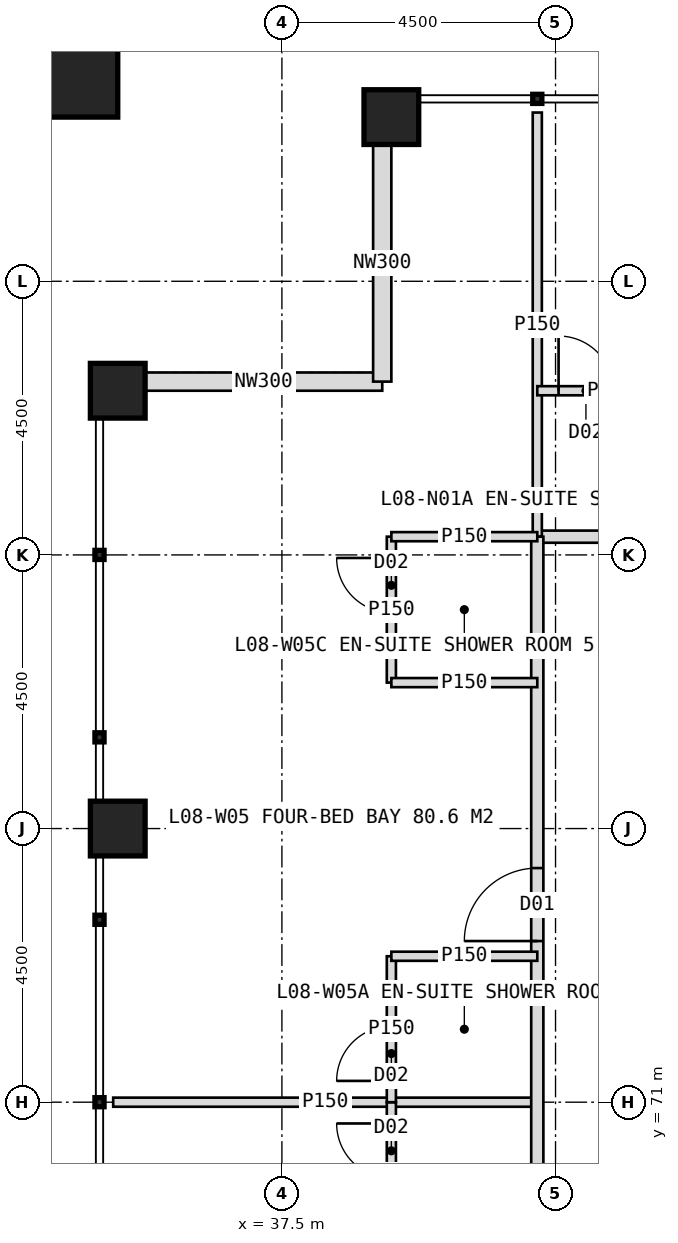
"""IFC4 building model, lengths in metres.
Left out: names, types, materials, properties, quantities, classifications, styles, units other than length and angle.
Written with IfcOpenShell. Run it as: python <this file> out.ifc"""

import sys

from ifc_helpers import new_model, si_unit, direction, frame, frame_2d, origin, origin_2d, place, context, subcontext, project, spatial, rectangle, hollow_rectangle, extrude, element, fill, save


model = new_model("IFC4")
c1 = context("Model", 3, precision=1e-05, world=origin(), true_north=direction((0.0, 1.0)))
c2 = subcontext(c1, "Body", "Model", "MODEL_VIEW")
j1 = project(units=[si_unit("LENGTHUNIT", "METRE"), si_unit("PLANEANGLEUNIT", "RADIAN")], contexts=[c1])
p1 = place(None, origin())
s1 = spatial("IfcSite", under=j1, at=p1, CompositionType="ELEMENT")
p2 = place(p1, origin())
s2 = spatial("IfcBuilding", under=s1, at=p2, CompositionType="ELEMENT")
p3 = place(p2, frame((0.0, 0.0, 39.0)))
s3 = spatial("IfcBuildingStorey", under=s2, at=p3, CompositionType="ELEMENT", Elevation=39.0)
for number, where, z_axis, x_axis in (
    (1, (39.3, 87.2, 0.0), (0.0, 0.0, 1.0), (1.0, 0.0, 0.0)),
    (2, (34.8, 75.5, 0.0), (0.0, 0.0, 1.0), (1.0, 0.0, 0.0)),
    (3, (34.8, 82.7, 0.0), (0.0, 0.0, 1.0), (1.0, 0.0, 0.0)),
):
    element("IfcColumn", number, at=place(p3, frame(where, z_axis=z_axis, x_axis=x_axis)), inside=s3, PredefinedType="COLUMN", context=c2, shape_type="SweptSolid", body=[
        extrude(hollow_rectangle(XDim=0.9, YDim=0.9, WallThickness=0.08, at=origin_2d()), origin(), (0.0, 0.0, 1.0), 4.0),
    ])
p4 = place(p3, frame((33.9, 88.1, 0.0), z_axis=(0.0, 0.0, 1.0), x_axis=(1.0, 0.0, 0.0)))
e4 = element("IfcColumn", 4, at=p4, inside=s3, PredefinedType="COLUMN", context=c2, shape_type="SweptSolid", body=[
    extrude(hollow_rectangle(XDim=1.8, YDim=1.8, WallThickness=0.1, at=origin_2d()), origin(), (0.0, 0.0, 1.0), 4.0),
])
for number, where, z_axis, x_axis in (
    (5, (35.25, 82.85, 0.0), (0.0, 0.0, 1.0), (1.0, 0.0, 0.0)),
    (6, (39.15, 82.85, 0.0), (0.0, 0.0, 1.0), (0.0, 1.0, 0.0)),
):
    element("IfcWall", number, at=place(p3, frame(where, z_axis=z_axis, x_axis=x_axis)), inside=s3, PredefinedType="ELEMENTEDWALL", context=c2, shape_type="SweptSolid", body=[
        extrude(rectangle(XDim=3.9, YDim=0.3, at=frame_2d((1.95, 0.0))), origin(), (0.0, 0.0, 1.0), 2.95),
    ])
p5 = place(p3, frame((41.7, 80.3, 0.0), z_axis=(0.0, 0.0, 1.0), x_axis=(1.0, 0.0, 0.0)))
e7 = element("IfcWall", 7, at=p5, inside=s3, PredefinedType="PARTITIONING", context=c2, shape_type="SweptSolid", body=[
    extrude(rectangle(XDim=36.6, YDim=0.2, at=frame_2d((18.3, 0.0))), origin(), (0.0, 0.0, 1.0), 3.75),
])
p6 = place(p5, frame((2.65, 0.0, 0.0)))
e8 = element("IfcOpeningElement", 8, at=p6, cuts=e7, PredefinedType="OPENING", context=c2, shape_type="SweptSolid", body=[
    extrude(rectangle(XDim=1.2, YDim=2.2, at=frame_2d((0.6, 1.1))), frame((0.0, 0.11, 0.0), z_axis=(0.0, -1.0, 0.0), x_axis=(1.0, 0.0, 0.0)), (0.0, 0.0, 1.0), 0.22),
])
p7 = place(p5, frame((11.95, 0.0, 0.0)))
e9 = element("IfcOpeningElement", 9, at=p7, cuts=e7, PredefinedType="OPENING", context=c2, shape_type="SweptSolid", body=[
    extrude(rectangle(XDim=1.2, YDim=2.2, at=frame_2d((0.6, 1.1))), frame((0.0, 0.11, 0.0), z_axis=(0.0, -1.0, 0.0), x_axis=(1.0, 0.0, 0.0)), (0.0, 0.0, 1.0), 0.22),
])
p8 = place(p5, frame((20.8, 0.0, 0.0)))
e10 = element("IfcOpeningElement", 10, at=p8, cuts=e7, PredefinedType="OPENING", context=c2, shape_type="SweptSolid", body=[
    extrude(rectangle(XDim=1.0, YDim=2.1, at=frame_2d((0.5, 1.05))), frame((0.0, 0.11, 0.0), z_axis=(0.0, -1.0, 0.0), x_axis=(1.0, 0.0, 0.0)), (0.0, 0.0, 1.0), 0.22),
])
p9 = place(p5, frame((26.95, 0.0, 0.0)))
e11 = element("IfcOpeningElement", 11, at=p9, cuts=e7, PredefinedType="OPENING", context=c2, shape_type="SweptSolid", body=[
    extrude(rectangle(XDim=1.2, YDim=2.2, at=frame_2d((0.6, 1.1))), frame((0.0, 0.11, 0.0), z_axis=(0.0, -1.0, 0.0), x_axis=(1.0, 0.0, 0.0)), (0.0, 0.0, 1.0), 0.22),
])
p10 = place(p3, frame((41.7, 80.3, 0.0), z_axis=(0.0, 0.0, 1.0), x_axis=(0.0, 1.0, 0.0)))
e12 = element("IfcWall", 12, at=p10, inside=s3, PredefinedType="PARTITIONING", context=c2, shape_type="SweptSolid", body=[
    extrude(rectangle(XDim=6.975, YDim=0.15, at=frame_2d((3.487, 0.0))), origin(), (0.0, 0.0, 1.0), 3.75),
])
p11 = place(p3, frame((41.7, 82.7, 0.0), z_axis=(0.0, 0.0, 1.0), x_axis=(1.0, 0.0, 0.0)))
e13 = element("IfcWall", 13, at=p11, inside=s3, PredefinedType="PARTITIONING", context=c2, shape_type="SweptSolid", body=[
    extrude(rectangle(XDim=2.4, YDim=0.15, at=frame_2d((1.2, 0.0))), origin(), (0.0, 0.0, 1.0), 2.95),
])
p12 = place(p11, frame((0.35, 0.0, 0.0)))
e14 = element("IfcOpeningElement", 14, at=p12, cuts=e13, PredefinedType="OPENING", context=c2, shape_type="SweptSolid", body=[
    extrude(rectangle(XDim=0.9, YDim=2.1, at=frame_2d((0.45, 1.05))), frame((0.0, 0.085, 0.0), z_axis=(0.0, -1.0, 0.0), x_axis=(1.0, 0.0, 0.0)), (0.0, 0.0, 1.0), 0.17),
])
p13 = place(p3, frame((41.7, 71.0, 0.0), z_axis=(0.0, 0.0, 1.0), x_axis=(-1.0, 0.0, 0.0)))
e15 = element("IfcWall", 15, at=p13, inside=s3, PredefinedType="PARTITIONING", context=c2, shape_type="SweptSolid", body=[
    extrude(rectangle(XDim=6.975, YDim=0.15, at=frame_2d((3.487, 0.0))), origin(), (0.0, 0.0, 1.0), 3.75),
])
p14 = place(p3, frame((41.7, 43.7, 0.0), z_axis=(0.0, 0.0, 1.0), x_axis=(0.0, 1.0, 0.0)))
e16 = element("IfcWall", 16, at=p14, inside=s3, PredefinedType="PARTITIONING", context=c2, shape_type="SweptSolid", body=[
    extrude(rectangle(XDim=36.6, YDim=0.2, at=frame_2d((18.3, 0.0))), origin(), (0.0, 0.0, 1.0), 3.75),
])
p15 = place(p14, frame((2.65, 0.0, 0.0)))
e17 = element("IfcOpeningElement", 17, at=p15, cuts=e16, PredefinedType="OPENING", context=c2, shape_type="SweptSolid", body=[
    extrude(rectangle(XDim=1.2, YDim=2.2, at=frame_2d((0.6, 1.1))), frame((0.0, 0.11, 0.0), z_axis=(0.0, -1.0, 0.0), x_axis=(1.0, 0.0, 0.0)), (0.0, 0.0, 1.0), 0.22),
])
p16 = place(p14, frame((8.95, 0.0, 0.0)))
e18 = element("IfcOpeningElement", 18, at=p16, cuts=e16, PredefinedType="OPENING", context=c2, shape_type="SweptSolid", body=[
    extrude(rectangle(XDim=1.2, YDim=2.2, at=frame_2d((0.6, 1.1))), frame((0.0, 0.11, 0.0), z_axis=(0.0, -1.0, 0.0), x_axis=(1.0, 0.0, 0.0)), (0.0, 0.0, 1.0), 0.22),
])
p17 = place(p14, frame((14.95, 0.0, 0.0)))
e19 = element("IfcOpeningElement", 19, at=p17, cuts=e16, PredefinedType="OPENING", context=c2, shape_type="SweptSolid", body=[
    extrude(rectangle(XDim=1.2, YDim=2.2, at=frame_2d((0.6, 1.1))), frame((0.0, 0.11, 0.0), z_axis=(0.0, -1.0, 0.0), x_axis=(1.0, 0.0, 0.0)), (0.0, 0.0, 1.0), 0.22),
])
p18 = place(p14, frame((20.95, 0.0, 0.0)))
e20 = element("IfcOpeningElement", 20, at=p18, cuts=e16, PredefinedType="OPENING", context=c2, shape_type="SweptSolid", body=[
    extrude(rectangle(XDim=1.2, YDim=2.2, at=frame_2d((0.6, 1.1))), frame((0.0, 0.11, 0.0), z_axis=(0.0, -1.0, 0.0), x_axis=(1.0, 0.0, 0.0)), (0.0, 0.0, 1.0), 0.22),
])
p19 = place(p14, frame((29.95, 0.0, 0.0)))
e21 = element("IfcOpeningElement", 21, at=p19, cuts=e16, PredefinedType="OPENING", context=c2, shape_type="SweptSolid", body=[
    extrude(rectangle(XDim=1.2, YDim=2.2, at=frame_2d((0.6, 1.1))), frame((0.0, 0.11, 0.0), z_axis=(0.0, -1.0, 0.0), x_axis=(1.0, 0.0, 0.0)), (0.0, 0.0, 1.0), 0.22),
])
p20 = place(p3, frame((39.3, 68.6, 0.0), z_axis=(0.0, 0.0, 1.0), x_axis=(0.0, 1.0, 0.0)))
e22 = element("IfcWall", 22, at=p20, inside=s3, PredefinedType="PARTITIONING", context=c2, shape_type="SweptSolid", body=[
    extrude(rectangle(XDim=2.4, YDim=0.15, at=frame_2d((1.2, 0.0))), origin(), (0.0, 0.0, 1.0), 3.75),
])
p21 = place(p20, frame((1.15, 0.0, 0.0)))
e23 = element("IfcOpeningElement", 23, at=p21, cuts=e22, PredefinedType="OPENING", context=c2, shape_type="SweptSolid", body=[
    extrude(rectangle(XDim=0.9, YDim=2.1, at=frame_2d((0.45, 1.05))), frame((0.0, 0.085, 0.0), z_axis=(0.0, -1.0, 0.0), x_axis=(1.0, 0.0, 0.0)), (0.0, 0.0, 1.0), 0.17),
])
p22 = place(p3, frame((39.3, 71.0, 0.0), z_axis=(0.0, 0.0, 1.0), x_axis=(0.0, 1.0, 0.0)))
e24 = element("IfcWall", 24, at=p22, inside=s3, PredefinedType="PARTITIONING", context=c2, shape_type="SweptSolid", body=[
    extrude(rectangle(XDim=2.4, YDim=0.15, at=frame_2d((1.2, 0.0))), origin(), (0.0, 0.0, 1.0), 3.75),
])
p23 = place(p22, frame((0.35, 0.0, 0.0)))
e25 = element("IfcOpeningElement", 25, at=p23, cuts=e24, PredefinedType="OPENING", context=c2, shape_type="SweptSolid", body=[
    extrude(rectangle(XDim=0.9, YDim=2.1, at=frame_2d((0.45, 1.05))), frame((0.0, 0.085, 0.0), z_axis=(0.0, -1.0, 0.0), x_axis=(1.0, 0.0, 0.0)), (0.0, 0.0, 1.0), 0.17),
])
p24 = place(p3, frame((41.7, 73.4, 0.0), z_axis=(0.0, 0.0, 1.0), x_axis=(-1.0, 0.0, 0.0)))
e26 = element("IfcWall", 26, at=p24, inside=s3, PredefinedType="PARTITIONING", context=c2, shape_type="SweptSolid", body=[
    extrude(rectangle(XDim=2.4, YDim=0.15, at=frame_2d((1.2, 0.0))), origin(), (0.0, 0.0, 1.0), 3.75),
])
p25 = place(p3, frame((39.3, 77.9, 0.0), z_axis=(0.0, 0.0, 1.0), x_axis=(0.0, 1.0, 0.0)))
e27 = element("IfcWall", 27, at=p25, inside=s3, PredefinedType="PARTITIONING", context=c2, shape_type="SweptSolid", body=[
    extrude(rectangle(XDim=2.4, YDim=0.15, at=frame_2d((1.2, 0.0))), origin(), (0.0, 0.0, 1.0), 2.95),
])
p26 = place(p25, frame((1.15, 0.0, 0.0)))
e28 = element("IfcOpeningElement", 28, at=p26, cuts=e27, PredefinedType="OPENING", context=c2, shape_type="SweptSolid", body=[
    extrude(rectangle(XDim=0.9, YDim=2.1, at=frame_2d((0.45, 1.05))), frame((0.0, 0.085, 0.0), z_axis=(0.0, -1.0, 0.0), x_axis=(1.0, 0.0, 0.0)), (0.0, 0.0, 1.0), 0.17),
])
for number, where, z_axis, x_axis in (
    (29, (41.7, 77.9, 0.0), (0.0, 0.0, 1.0), (-1.0, 0.0, 0.0)),
    (30, (41.7, 80.3, 0.0), (0.0, 0.0, 1.0), (-1.0, 0.0, 0.0)),
):
    element("IfcWall", number, at=place(p3, frame(where, z_axis=z_axis, x_axis=x_axis)), inside=s3, PredefinedType="PARTITIONING", context=c2, shape_type="SweptSolid", body=[
        extrude(rectangle(XDim=2.4, YDim=0.15, at=frame_2d((1.2, 0.0))), origin(), (0.0, 0.0, 1.0), 3.75),
    ])
p27 = place(p12, origin())
e31 = element("IfcDoor", 31, at=p27, inside=s3, OperationType="SINGLE_SWING_LEFT", PredefinedType="DOOR", context=c2, shape_type="SweptSolid", body=[
    extrude(rectangle(XDim=0.9, YDim=2.1, at=frame_2d((0.45, 1.05))), frame((0.0, 0.025, 0.0), z_axis=(0.0, -1.0, 0.0), x_axis=(1.0, 0.0, 0.0)), (0.0, 0.0, 1.0), 0.05),
])
fill(e14, e31)
p28 = place(p21, origin())
e32 = element("IfcDoor", 32, at=p28, inside=s3, OperationType="SINGLE_SWING_RIGHT", PredefinedType="DOOR", context=c2, shape_type="SweptSolid", body=[
    extrude(rectangle(XDim=0.9, YDim=2.1, at=frame_2d((0.45, 1.05))), frame((0.0, 0.025, 0.0), z_axis=(0.0, -1.0, 0.0), x_axis=(1.0, 0.0, 0.0)), (0.0, 0.0, 1.0), 0.05),
])
fill(e23, e32)
p29 = place(p19, origin())
e33 = element("IfcDoor", 33, at=p29, inside=s3, OperationType="SINGLE_SWING_LEFT", PredefinedType="DOOR", context=c2, shape_type="SweptSolid", body=[
    extrude(rectangle(XDim=1.2, YDim=2.2, at=frame_2d((0.6, 1.1))), frame((0.0, 0.025, 0.0), z_axis=(0.0, -1.0, 0.0), x_axis=(1.0, 0.0, 0.0)), (0.0, 0.0, 1.0), 0.05),
])
fill(e21, e33)
p30 = place(p23, origin())
e34 = element("IfcDoor", 34, at=p30, inside=s3, OperationType="SINGLE_SWING_LEFT", PredefinedType="DOOR", context=c2, shape_type="SweptSolid", body=[
    extrude(rectangle(XDim=0.9, YDim=2.1, at=frame_2d((0.45, 1.05))), frame((0.0, 0.025, 0.0), z_axis=(0.0, -1.0, 0.0), x_axis=(1.0, 0.0, 0.0)), (0.0, 0.0, 1.0), 0.05),
])
fill(e25, e34)
p31 = place(p26, origin())
e35 = element("IfcDoor", 35, at=p31, inside=s3, OperationType="SINGLE_SWING_RIGHT", PredefinedType="DOOR", context=c2, shape_type="SweptSolid", body=[
    extrude(rectangle(XDim=0.9, YDim=2.1, at=frame_2d((0.45, 1.05))), frame((0.0, 0.025, 0.0), z_axis=(0.0, -1.0, 0.0), x_axis=(1.0, 0.0, 0.0)), (0.0, 0.0, 1.0), 0.05),
])
fill(e28, e35)
save(model, sys.argv[1])
